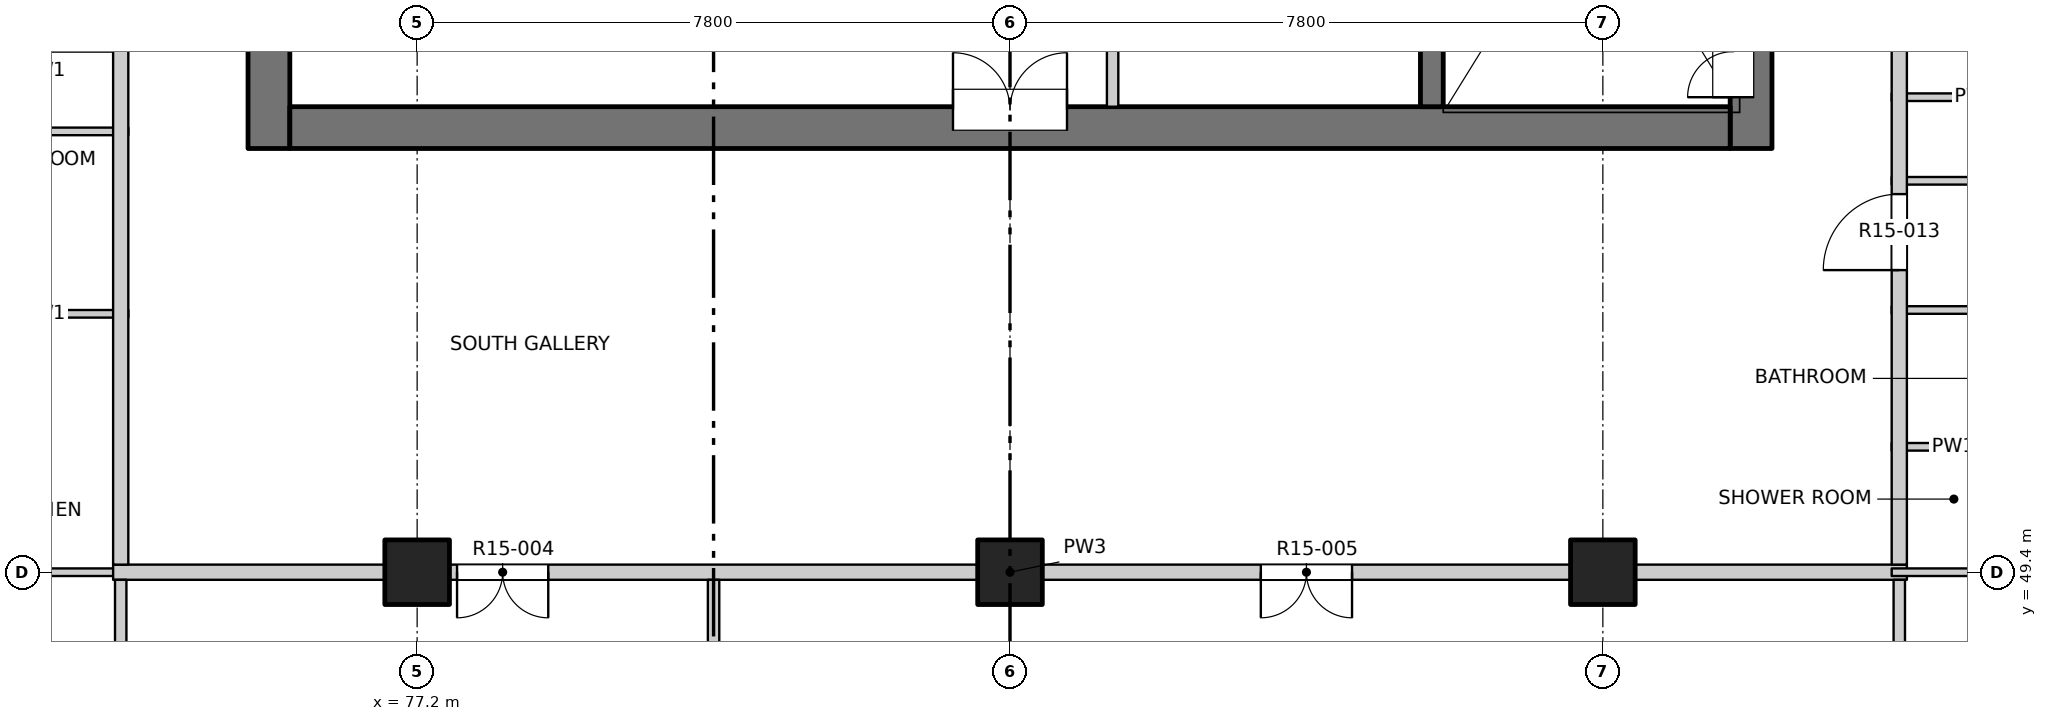
"""IFC4 building model, lengths in metres.
Left out: names, types, materials, properties, quantities, classifications, styles, units other than length and angle.
Written with IfcOpenShell. Run it as: python <this file> out.ifc"""

import sys

from ifc_helpers import new_model, si_unit, direction, frame, frame_2d, origin, origin_2d, place, context, subcontext, project, spatial, rectangle, extrude, element, fill, save


model = new_model("IFC4")
c1 = context("Model", 3, precision=1e-05, world=origin(), true_north=direction((0.0, 1.0)))
c2 = subcontext(c1, "Body", "Model", "MODEL_VIEW")
j1 = project(units=[si_unit("LENGTHUNIT", "METRE"), si_unit("PLANEANGLEUNIT", "RADIAN")], contexts=[c1])
p1 = place(None, origin())
s1 = spatial("IfcSite", under=j1, at=p1, CompositionType="ELEMENT")
p2 = place(p1, origin())
s2 = spatial("IfcBuilding", under=s1, at=p2, CompositionType="ELEMENT")
p3 = place(p2, frame((0.0, 0.0, 158.8)))
s3 = spatial("IfcBuildingStorey", under=s2, at=p3, CompositionType="ELEMENT", Elevation=158.8)
for number, where, z_axis, x_axis in (
    (1, (77.2, 49.4, -0.25), (0.0, 0.0, 1.0), (1.0, 0.0, 0.0)),
    (2, (85.0, 49.4, -0.25), (0.0, 0.0, 1.0), (1.0, 0.0, 0.0)),
    (3, (92.8, 49.4, -0.25), (0.0, 0.0, 1.0), (1.0, 0.0, 0.0)),
):
    element("IfcColumn", number, at=place(p3, frame(where, z_axis=z_axis, x_axis=x_axis)), inside=s3, PredefinedType="COLUMN", context=c2, shape_type="SweptSolid", body=[
        extrude(rectangle(XDim=0.85, YDim=0.85, at=origin_2d()), origin(), (0.0, 0.0, 1.0), 3.4),
    ])
p4 = place(p3, frame((75.25, 54.975, -0.25), z_axis=(0.0, 0.0, 1.0), x_axis=(0.0, 1.0, 0.0)))
e4 = element("IfcWall", 4, at=p4, inside=s3, PredefinedType="SOLIDWALL", context=c2, shape_type="SweptSolid", body=[
    extrude(rectangle(XDim=22.325, YDim=0.55, at=frame_2d((11.163, 0.0))), origin(), (0.0, 0.0, 1.0), 3.4),
])
p5 = place(p4, frame((7.475, 0.0, 0.25)))
e5 = element("IfcOpeningElement", 5, at=p5, cuts=e4, PredefinedType="OPENING", context=c2, shape_type="SweptSolid", body=[
    extrude(rectangle(XDim=0.9, YDim=2.1, at=frame_2d((0.45, 1.05))), frame((0.0, 0.285, 0.0), z_axis=(0.0, -1.0, 0.0), x_axis=(1.0, 0.0, 0.0)), (0.0, 0.0, 1.0), 0.57),
])
p6 = place(p4, frame((12.125, 0.0, 0.25)))
e6 = element("IfcOpeningElement", 6, at=p6, cuts=e4, PredefinedType="OPENING", context=c2, shape_type="SweptSolid", body=[
    extrude(rectangle(XDim=0.9, YDim=2.1, at=frame_2d((0.45, 1.05))), frame((0.0, 0.285, 0.0), z_axis=(0.0, -1.0, 0.0), x_axis=(1.0, 0.0, 0.0)), (0.0, 0.0, 1.0), 0.57),
])
p7 = place(p4, frame((16.625, 0.0, 0.25)))
e7 = element("IfcOpeningElement", 7, at=p7, cuts=e4, PredefinedType="OPENING", context=c2, shape_type="SweptSolid", body=[
    extrude(rectangle(XDim=0.9, YDim=2.1, at=frame_2d((0.45, 1.05))), frame((0.0, 0.285, 0.0), z_axis=(0.0, -1.0, 0.0), x_axis=(1.0, 0.0, 0.0)), (0.0, 0.0, 1.0), 0.57),
])
p8 = place(p4, frame((20.075, 0.0, 0.25)))
e8 = element("IfcOpeningElement", 8, at=p8, cuts=e4, PredefinedType="OPENING", context=c2, shape_type="SweptSolid", body=[
    extrude(rectangle(XDim=0.9, YDim=2.1, at=frame_2d((0.45, 1.05))), frame((0.0, 0.285, 0.0), z_axis=(0.0, -1.0, 0.0), x_axis=(1.0, 0.0, 0.0)), (0.0, 0.0, 1.0), 0.57),
])
p9 = place(p3, frame((94.75, 54.975, -0.25), z_axis=(0.0, 0.0, 1.0), x_axis=(0.0, 1.0, 0.0)))
e9 = element("IfcWall", 9, at=p9, inside=s3, PredefinedType="SOLIDWALL", context=c2, shape_type="SweptSolid", body=[
    extrude(rectangle(XDim=6.975, YDim=0.55, at=frame_2d((3.487, 0.0))), origin(), (0.0, 0.0, 1.0), 3.4),
])
p10 = place(p9, frame((0.675, 0.0, 0.25)))
e10 = element("IfcOpeningElement", 10, at=p10, cuts=e9, PredefinedType="OPENING", context=c2, shape_type="SweptSolid", body=[
    extrude(rectangle(XDim=1.2, YDim=2.1, at=frame_2d((0.6, 1.05))), frame((0.0, 0.285, 0.0), z_axis=(0.0, -1.0, 0.0), x_axis=(1.0, 0.0, 0.0)), (0.0, 0.0, 1.0), 0.57),
])
p11 = place(p3, frame((75.525, 55.25, -0.25), z_axis=(0.0, 0.0, 1.0), x_axis=(1.0, 0.0, 0.0)))
e11 = element("IfcWall", 11, at=p11, inside=s3, PredefinedType="SOLIDWALL", context=c2, shape_type="SweptSolid", body=[
    extrude(rectangle(XDim=18.95, YDim=0.55, at=frame_2d((9.475, 0.0))), origin(), (0.0, 0.0, 1.0), 3.4),
])
p12 = place(p11, frame((8.725, 0.0, 0.25)))
e12 = element("IfcOpeningElement", 12, at=p12, cuts=e11, PredefinedType="OPENING", context=c2, shape_type="SweptSolid", body=[
    extrude(rectangle(XDim=1.5, YDim=2.1, at=frame_2d((0.75, 1.05))), frame((0.0, 0.285, 0.0), z_axis=(0.0, -1.0, 0.0), x_axis=(1.0, 0.0, 0.0)), (0.0, 0.0, 1.0), 0.57),
])
p13 = place(p3, frame((90.55, 55.525, -0.25), z_axis=(0.0, 0.0, 1.0), x_axis=(0.0, 1.0, 0.0)))
e13 = element("IfcWall", 13, at=p13, inside=s3, PredefinedType="SOLIDWALL", context=c2, shape_type="SweptSolid", body=[
    extrude(rectangle(XDim=6.425, YDim=0.3, at=frame_2d((3.212, 0.0))), origin(), (0.0, 0.0, 1.0), 3.4),
])
p14 = place(p3, frame((65.8, 49.4, 0.0), z_axis=(0.0, 0.0, 1.0), x_axis=(1.0, 0.0, 0.0)))
e14 = element("IfcWall", 14, at=p14, inside=s3, PredefinedType="PARTITIONING", context=c2, shape_type="SweptSolid", body=[
    extrude(rectangle(XDim=7.6, YDim=0.1, at=frame_2d((3.8, 0.0))), origin(), (0.0, 0.0, 1.0), 3.15),
])
p15 = place(p14, frame((4.14, 0.0, 0.0)))
e15 = element("IfcOpeningElement", 15, at=p15, cuts=e14, PredefinedType="OPENING", context=c2, shape_type="SweptSolid", body=[
    extrude(rectangle(XDim=0.9, YDim=2.1, at=frame_2d((0.45, 1.05))), frame((0.0, 0.06, 0.0), z_axis=(0.0, -1.0, 0.0), x_axis=(1.0, 0.0, 0.0)), (0.0, 0.0, 1.0), 0.12),
])
p16 = place(p3, frame((73.2, 49.4, 0.0), z_axis=(0.0, 0.0, 1.0), x_axis=(1.0, 0.0, 0.0)))
e16 = element("IfcWall", 16, at=p16, inside=s3, PredefinedType="PARTITIONING", context=c2, shape_type="SweptSolid", body=[
    extrude(rectangle(XDim=23.6, YDim=0.2, at=frame_2d((11.8, 0.0))), origin(), (0.0, 0.0, 1.0), 3.15),
])
p17 = place(p16, frame((4.525, 0.0, 0.0)))
e17 = element("IfcOpeningElement", 17, at=p17, cuts=e16, PredefinedType="OPENING", context=c2, shape_type="SweptSolid", body=[
    extrude(rectangle(XDim=1.2, YDim=2.1, at=frame_2d((0.6, 1.05))), frame((0.0, 0.11, 0.0), z_axis=(0.0, -1.0, 0.0), x_axis=(1.0, 0.0, 0.0)), (0.0, 0.0, 1.0), 0.22),
])
p18 = place(p16, frame((15.1, 0.0, 0.0)))
e18 = element("IfcOpeningElement", 18, at=p18, cuts=e16, PredefinedType="OPENING", context=c2, shape_type="SweptSolid", body=[
    extrude(rectangle(XDim=1.2, YDim=2.1, at=frame_2d((0.6, 1.05))), frame((0.0, 0.11, 0.0), z_axis=(0.0, -1.0, 0.0), x_axis=(1.0, 0.0, 0.0)), (0.0, 0.0, 1.0), 0.22),
])
p19 = place(p3, frame((96.6, 49.4, 0.0), z_axis=(0.0, 0.0, 1.0), x_axis=(1.0, 0.0, 0.0)))
e19 = element("IfcWall", 19, at=p19, inside=s3, PredefinedType="PARTITIONING", context=c2, shape_type="SweptSolid", body=[
    extrude(rectangle(XDim=7.6, YDim=0.1, at=frame_2d((3.8, 0.0))), origin(), (0.0, 0.0, 1.0), 3.15),
])
p20 = place(p19, frame((2.56, 0.0, 0.0)))
e20 = element("IfcOpeningElement", 20, at=p20, cuts=e19, PredefinedType="OPENING", context=c2, shape_type="SweptSolid", body=[
    extrude(rectangle(XDim=0.9, YDim=2.1, at=frame_2d((0.45, 1.05))), frame((0.0, 0.06, 0.0), z_axis=(0.0, -1.0, 0.0), x_axis=(1.0, 0.0, 0.0)), (0.0, 0.0, 1.0), 0.12),
])
for number, where, z_axis, x_axis in (
    (21, (96.6, 51.05, 0.0), (0.0, 0.0, 1.0), (1.0, 0.0, 0.0)),
    (22, (71.18, 52.8, 0.0), (0.0, 0.0, 1.0), (1.0, 0.0, 0.0)),
    (23, (96.6, 52.85, 0.0), (0.0, 0.0, 1.0), (1.0, 0.0, 0.0)),
    (24, (96.6, 54.55, 0.0), (0.0, 0.0, 1.0), (1.0, 0.0, 0.0)),
    (25, (71.18, 55.2, 0.0), (0.0, 0.0, 1.0), (1.0, 0.0, 0.0)),
    (26, (96.6, 55.65, 0.0), (0.0, 0.0, 1.0), (1.0, 0.0, 0.0)),
):
    element("IfcWall", number, at=place(p3, frame(where, z_axis=z_axis, x_axis=x_axis)), inside=s3, PredefinedType="PARTITIONING", context=c2, shape_type="SweptSolid", body=[
        extrude(rectangle(XDim=2.22, YDim=0.1, at=frame_2d((1.11, 0.0))), origin(), (0.0, 0.0, 1.0), 3.15),
    ])
p21 = place(p3, frame((73.3, 45.8, 0.0), z_axis=(0.0, 0.0, 1.0), x_axis=(0.0, 1.0, 0.0)))
e27 = element("IfcWall", 27, at=p21, inside=s3, PredefinedType="PARTITIONING", context=c2, shape_type="SweptSolid", body=[
    extrude(rectangle(XDim=3.5, YDim=0.15, at=frame_2d((1.75, 0.0))), origin(), (0.0, 0.0, 1.0), 3.15),
])
p22 = place(p3, frame((73.3, 49.5, 0.0), z_axis=(0.0, 0.0, 1.0), x_axis=(0.0, 1.0, 0.0)))
e28 = element("IfcWall", 28, at=p22, inside=s3, PredefinedType="PARTITIONING", context=c2, shape_type="SweptSolid", body=[
    extrude(rectangle(XDim=34.7, YDim=0.2, at=frame_2d((17.35, 0.0))), origin(), (0.0, 0.0, 1.0), 3.15),
])
p23 = place(p22, frame((6.975, 0.0, 0.0)))
e29 = element("IfcOpeningElement", 29, at=p23, cuts=e28, PredefinedType="OPENING", context=c2, shape_type="SweptSolid", body=[
    extrude(rectangle(XDim=1.0, YDim=2.1, at=frame_2d((0.5, 1.05))), frame((0.0, 0.11, 0.0), z_axis=(0.0, -1.0, 0.0), x_axis=(1.0, 0.0, 0.0)), (0.0, 0.0, 1.0), 0.22),
])
p24 = place(p22, frame((19.075, 0.0, 0.0)))
e30 = element("IfcOpeningElement", 30, at=p24, cuts=e28, PredefinedType="OPENING", context=c2, shape_type="SweptSolid", body=[
    extrude(rectangle(XDim=1.0, YDim=2.1, at=frame_2d((0.5, 1.05))), frame((0.0, 0.11, 0.0), z_axis=(0.0, -1.0, 0.0), x_axis=(1.0, 0.0, 0.0)), (0.0, 0.0, 1.0), 0.22),
])
p25 = place(p22, frame((27.675, 0.0, 0.0)))
e31 = element("IfcOpeningElement", 31, at=p25, cuts=e28, PredefinedType="OPENING", context=c2, shape_type="SweptSolid", body=[
    extrude(rectangle(XDim=1.0, YDim=2.1, at=frame_2d((0.5, 1.05))), frame((0.0, 0.11, 0.0), z_axis=(0.0, -1.0, 0.0), x_axis=(1.0, 0.0, 0.0)), (0.0, 0.0, 1.0), 0.22),
])
p26 = place(p3, frame((81.1, 45.8, 0.0), z_axis=(0.0, 0.0, 1.0), x_axis=(0.0, 1.0, 0.0)))
e32 = element("IfcWall", 32, at=p26, inside=s3, PredefinedType="PARTITIONING", context=c2, shape_type="SweptSolid", body=[
    extrude(rectangle(XDim=3.5, YDim=0.15, at=frame_2d((1.75, 0.0))), origin(), (0.0, 0.0, 1.0), 2.55),
])
p27 = place(p3, frame((86.35, 55.525, 0.0), z_axis=(0.0, 0.0, 1.0), x_axis=(0.0, 1.0, 0.0)))
e33 = element("IfcWall", 33, at=p27, inside=s3, PredefinedType="PARTITIONING", context=c2, shape_type="SweptSolid", body=[
    extrude(rectangle(XDim=5.5, YDim=0.15, at=frame_2d((2.75, 0.0))), origin(), (0.0, 0.0, 1.0), 3.15),
])
p28 = place(p27, frame((2.175, 0.0, 0.0)))
e34 = element("IfcOpeningElement", 34, at=p28, cuts=e33, PredefinedType="OPENING", context=c2, shape_type="SweptSolid", body=[
    extrude(rectangle(XDim=0.9, YDim=2.1, at=frame_2d((0.45, 1.05))), frame((0.0, 0.085, 0.0), z_axis=(0.0, -1.0, 0.0), x_axis=(1.0, 0.0, 0.0)), (0.0, 0.0, 1.0), 0.17),
])
p29 = place(p3, frame((96.7, 45.8, 0.0), z_axis=(0.0, 0.0, 1.0), x_axis=(0.0, 1.0, 0.0)))
e35 = element("IfcWall", 35, at=p29, inside=s3, PredefinedType="PARTITIONING", context=c2, shape_type="SweptSolid", body=[
    extrude(rectangle(XDim=3.5, YDim=0.15, at=frame_2d((1.75, 0.0))), origin(), (0.0, 0.0, 1.0), 3.15),
])
p30 = place(p3, frame((96.7, 49.5, 0.0), z_axis=(0.0, 0.0, 1.0), x_axis=(0.0, 1.0, 0.0)))
e36 = element("IfcWall", 36, at=p30, inside=s3, PredefinedType="PARTITIONING", context=c2, shape_type="SweptSolid", body=[
    extrude(rectangle(XDim=34.7, YDim=0.2, at=frame_2d((17.35, 0.0))), origin(), (0.0, 0.0, 1.0), 3.15),
])
p31 = place(p30, frame((3.875, 0.0, 0.0)))
e37 = element("IfcOpeningElement", 37, at=p31, cuts=e36, PredefinedType="OPENING", context=c2, shape_type="SweptSolid", body=[
    extrude(rectangle(XDim=1.0, YDim=2.1, at=frame_2d((0.5, 1.05))), frame((0.0, 0.11, 0.0), z_axis=(0.0, -1.0, 0.0), x_axis=(1.0, 0.0, 0.0)), (0.0, 0.0, 1.0), 0.22),
])
p32 = place(p30, frame((14.775, 0.0, 0.0)))
e38 = element("IfcOpeningElement", 38, at=p32, cuts=e36, PredefinedType="OPENING", context=c2, shape_type="SweptSolid", body=[
    extrude(rectangle(XDim=1.0, YDim=2.1, at=frame_2d((0.5, 1.05))), frame((0.0, 0.11, 0.0), z_axis=(0.0, -1.0, 0.0), x_axis=(1.0, 0.0, 0.0)), (0.0, 0.0, 1.0), 0.22),
])
p33 = place(p30, frame((29.175, 0.0, 0.0)))
e39 = element("IfcOpeningElement", 39, at=p33, cuts=e36, PredefinedType="OPENING", context=c2, shape_type="SweptSolid", body=[
    extrude(rectangle(XDim=1.0, YDim=2.1, at=frame_2d((0.5, 1.05))), frame((0.0, 0.11, 0.0), z_axis=(0.0, -1.0, 0.0), x_axis=(1.0, 0.0, 0.0)), (0.0, 0.0, 1.0), 0.22),
])
p34 = place(p17, origin())
e40 = element("IfcDoor", 40, at=p34, inside=s3, OperationType="DOUBLE_DOOR_SINGLE_SWING", PredefinedType="DOOR", context=c2, shape_type="SweptSolid", body=[
    extrude(rectangle(XDim=1.2, YDim=2.1, at=frame_2d((0.6, 1.05))), frame((0.0, 0.025, 0.0), z_axis=(0.0, -1.0, 0.0), x_axis=(1.0, 0.0, 0.0)), (0.0, 0.0, 1.0), 0.05),
])
fill(e17, e40)
p35 = place(p18, origin())
e41 = element("IfcDoor", 41, at=p35, inside=s3, OperationType="DOUBLE_DOOR_SINGLE_SWING", PredefinedType="DOOR", context=c2, shape_type="SweptSolid", body=[
    extrude(rectangle(XDim=1.2, YDim=2.1, at=frame_2d((0.6, 1.05))), frame((0.0, 0.025, 0.0), z_axis=(0.0, -1.0, 0.0), x_axis=(1.0, 0.0, 0.0)), (0.0, 0.0, 1.0), 0.05),
])
fill(e18, e41)
p36 = place(p31, origin())
e42 = element("IfcDoor", 42, at=p36, inside=s3, OperationType="SINGLE_SWING_RIGHT", PredefinedType="DOOR", context=c2, shape_type="SweptSolid", body=[
    extrude(rectangle(XDim=1.0, YDim=2.1, at=frame_2d((0.5, 1.05))), frame((0.0, 0.025, 0.0), z_axis=(0.0, -1.0, 0.0), x_axis=(1.0, 0.0, 0.0)), (0.0, 0.0, 1.0), 0.05),
])
fill(e37, e42)
p37 = place(p12, origin())
e43 = element("IfcDoor", 43, at=p37, inside=s3, OperationType="DOUBLE_DOOR_SINGLE_SWING", PredefinedType="DOOR", context=c2, shape_type="SweptSolid", body=[
    extrude(rectangle(XDim=1.5, YDim=2.1, at=frame_2d((0.75, 1.05))), frame((0.0, 0.26, 0.0), z_axis=(0.0, -1.0, 0.0), x_axis=(1.0, 0.0, 0.0)), (0.0, 0.0, 1.0), 0.05),
])
fill(e12, e43)
p38 = place(p10, origin())
e44 = element("IfcDoor", 44, at=p38, inside=s3, OperationType="DOUBLE_DOOR_SINGLE_SWING", PredefinedType="DOOR", context=c2, shape_type="SweptSolid", body=[
    extrude(rectangle(XDim=1.2, YDim=2.1, at=frame_2d((0.6, 1.05))), frame((0.0, 0.26, 0.0), z_axis=(0.0, -1.0, 0.0), x_axis=(1.0, 0.0, 0.0)), (0.0, 0.0, 1.0), 0.05),
])
fill(e10, e44)
save(model, sys.argv[1])
